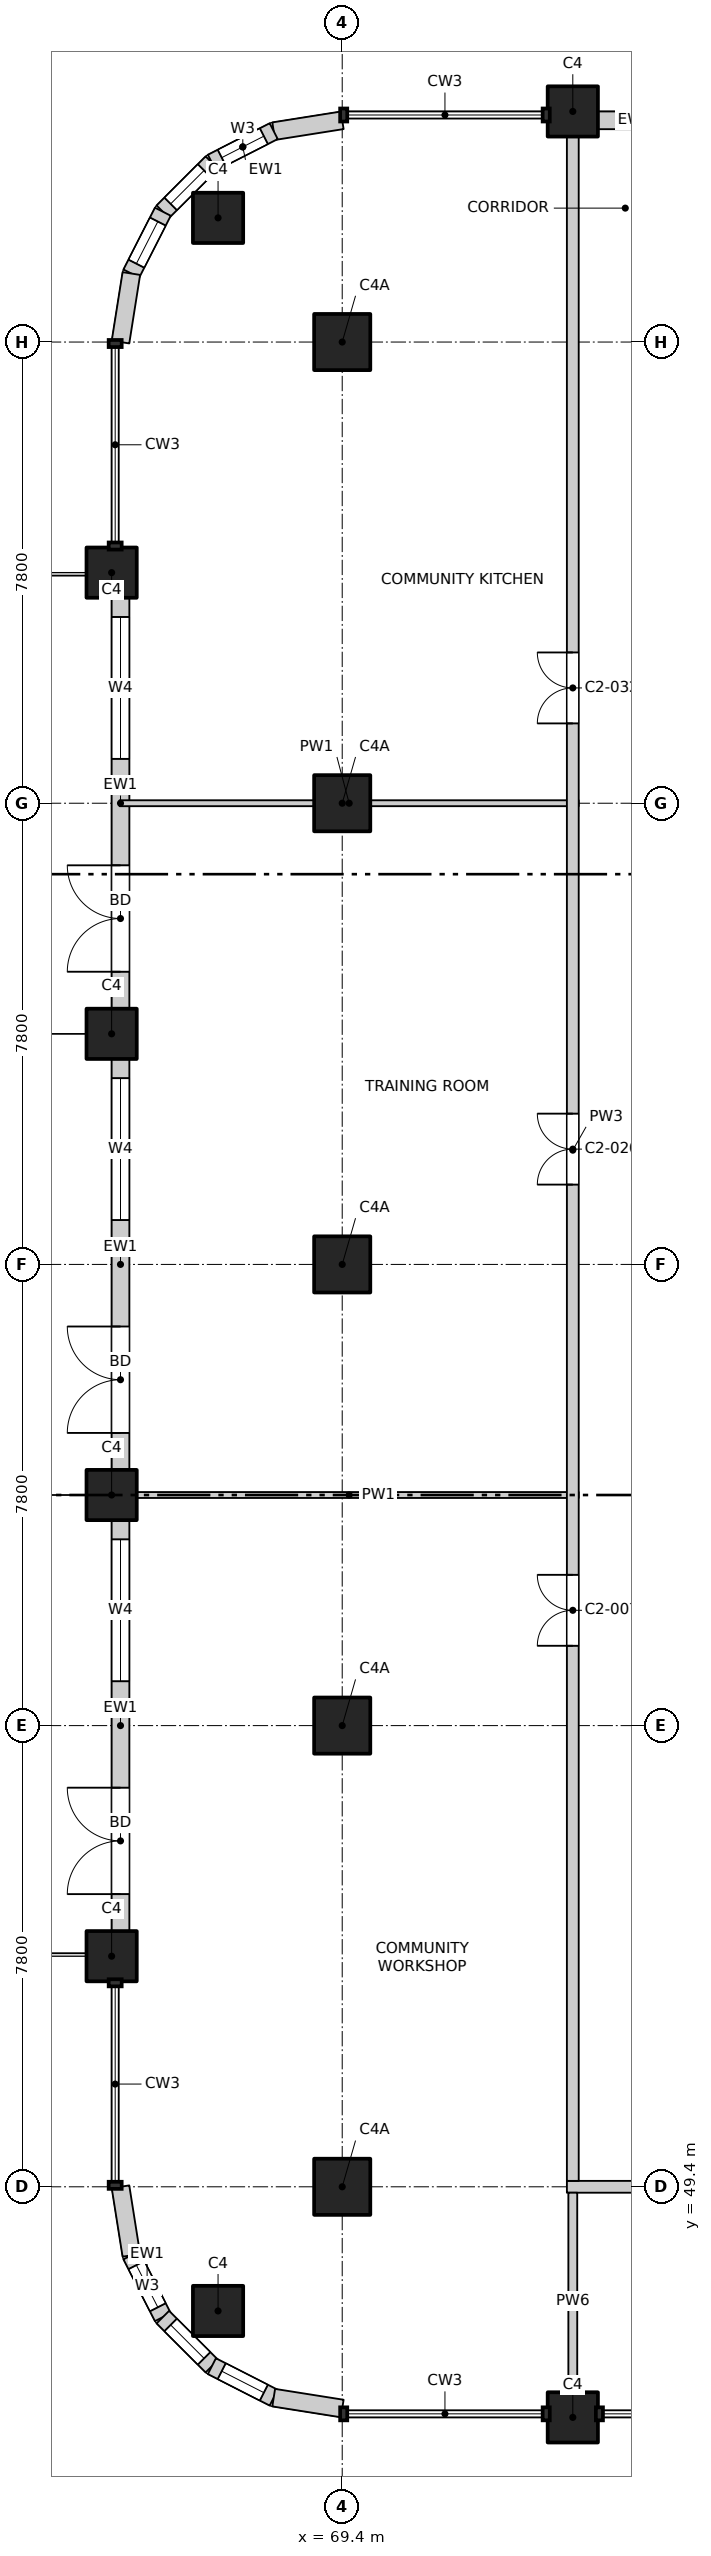
"""IFC4 building model, lengths in metres.
Left out: names, types, materials, properties, quantities, classifications, styles, units other than length and angle.
Written with IfcOpenShell. Run it as: python <this file> out.ifc"""

import sys

from ifc_helpers import new_model, si_unit, direction, frame, frame_2d, origin, origin_2d, place, context, subcontext, project, spatial, rectangle, extrude, element, fill, save


model = new_model("IFC4")
c1 = context("Model", 3, precision=1e-05, world=origin(), true_north=direction((0.0, 1.0)))
c2 = subcontext(c1, "Body", "Model", "MODEL_VIEW")
j1 = project(units=[si_unit("LENGTHUNIT", "METRE"), si_unit("PLANEANGLEUNIT", "RADIAN")], contexts=[c1])
p1 = place(None, origin())
s1 = spatial("IfcSite", under=j1, at=p1, CompositionType="ELEMENT")
p2 = place(p1, origin())
s2 = spatial("IfcBuilding", under=s1, at=p2, CompositionType="ELEMENT")
p3 = place(p2, frame((0.0, 0.0, 133.9)))
s3 = spatial("IfcBuildingStorey", under=s2, at=p3, CompositionType="ELEMENT", Elevation=133.9)
for number, where, z_axis, x_axis in (
    (1, (67.3, 47.3, -0.25), (0.0, 0.0, 1.0), (1.0, 0.0, 0.0)),
    (2, (67.3, 82.7, -0.25), (0.0, 0.0, 1.0), (1.0, 0.0, 0.0)),
    (3, (65.5, 53.3, -0.25), (0.0, 0.0, 1.0), (1.0, 0.0, 0.0)),
    (4, (73.3, 45.5, -0.25), (0.0, 0.0, 1.0), (1.0, 0.0, 0.0)),
    (5, (73.3, 84.5, -0.25), (0.0, 0.0, 1.0), (1.0, 0.0, 0.0)),
    (6, (65.5, 61.1, -0.25), (0.0, 0.0, 1.0), (1.0, 0.0, 0.0)),
    (7, (65.5, 68.9, -0.25), (0.0, 0.0, 1.0), (1.0, 0.0, 0.0)),
    (8, (65.5, 76.7, -0.25), (0.0, 0.0, 1.0), (1.0, 0.0, 0.0)),
):
    element("IfcColumn", number, at=place(p3, frame(where, z_axis=z_axis, x_axis=x_axis)), inside=s3, PredefinedType="COLUMN", context=c2, shape_type="SweptSolid", body=[
        extrude(rectangle(XDim=0.85, YDim=0.85, at=origin_2d()), origin(), (0.0, 0.0, 1.0), 3.4),
    ])
for number, where, z_axis, x_axis in (
    (9, (69.4, 49.4, -0.25), (0.0, 0.0, 1.0), (1.0, 0.0, 0.0)),
    (10, (69.4, 57.2, -0.25), (0.0, 0.0, 1.0), (1.0, 0.0, 0.0)),
    (11, (69.4, 65.0, -0.25), (0.0, 0.0, 1.0), (1.0, 0.0, 0.0)),
    (12, (69.4, 72.8, -0.25), (0.0, 0.0, 1.0), (1.0, 0.0, 0.0)),
    (13, (69.4, 80.6, -0.25), (0.0, 0.0, 1.0), (1.0, 0.0, 0.0)),
):
    element("IfcColumn", number, at=place(p3, frame(where, z_axis=z_axis, x_axis=x_axis)), inside=s3, PredefinedType="COLUMN", context=c2, shape_type="SweptSolid", body=[
        extrude(rectangle(XDim=0.95, YDim=0.95, at=origin_2d()), origin(), (0.0, 0.0, 1.0), 3.4),
    ])
p4 = place(p3, frame((73.725, 84.35, 0.0), z_axis=(0.0, 0.0, 1.0), x_axis=(1.0, 0.0, 0.0)))
e14 = element("IfcWall", 14, at=p4, inside=s3, PredefinedType="SOLIDWALL", context=c2, shape_type="SweptSolid", body=[
    extrude(rectangle(XDim=1.25, YDim=0.3, at=frame_2d((0.625, 0.0))), origin(), (0.0, 0.0, 1.0), 2.7),
])
p5 = place(p3, frame((65.65, 53.725, 0.0), z_axis=(0.0, 0.0, 1.0), x_axis=(0.0, 1.0, 0.0)))
e15 = element("IfcWall", 15, at=p5, inside=s3, PredefinedType="SOLIDWALL", context=c2, shape_type="SweptSolid", body=[
    extrude(rectangle(XDim=6.95, YDim=0.3, at=frame_2d((3.475, 0.0))), origin(), (0.0, 0.0, 1.0), 2.7),
])
p6 = place(p5, frame((0.625, 0.0, 0.0)))
e16 = element("IfcOpeningElement", 16, at=p6, cuts=e15, PredefinedType="OPENING", context=c2, shape_type="SweptSolid", body=[
    extrude(rectangle(XDim=1.8, YDim=2.4, at=frame_2d((0.9, 1.2))), frame((0.0, 0.16, 0.0), z_axis=(0.0, -1.0, 0.0), x_axis=(1.0, 0.0, 0.0)), (0.0, 0.0, 1.0), 0.32),
])
p7 = place(p5, frame((4.225, 0.0, 0.6)))
e17 = element("IfcOpeningElement", 17, at=p7, cuts=e15, PredefinedType="OPENING", context=c2, shape_type="SweptSolid", body=[
    extrude(rectangle(XDim=2.4, YDim=2.1, at=frame_2d((1.2, 1.05))), frame((0.0, 0.16, 0.0), z_axis=(0.0, -1.0, 0.0), x_axis=(1.0, 0.0, 0.0)), (0.0, 0.0, 1.0), 0.32),
])
p8 = place(p3, frame((65.65, 61.525, 0.0), z_axis=(0.0, 0.0, 1.0), x_axis=(0.0, 1.0, 0.0)))
e18 = element("IfcWall", 18, at=p8, inside=s3, PredefinedType="SOLIDWALL", context=c2, shape_type="SweptSolid", body=[
    extrude(rectangle(XDim=6.95, YDim=0.3, at=frame_2d((3.475, 0.0))), origin(), (0.0, 0.0, 1.0), 2.7),
])
p9 = place(p8, frame((0.625, 0.0, 0.0)))
e19 = element("IfcOpeningElement", 19, at=p9, cuts=e18, PredefinedType="OPENING", context=c2, shape_type="SweptSolid", body=[
    extrude(rectangle(XDim=1.8, YDim=2.4, at=frame_2d((0.9, 1.2))), frame((0.0, 0.16, 0.0), z_axis=(0.0, -1.0, 0.0), x_axis=(1.0, 0.0, 0.0)), (0.0, 0.0, 1.0), 0.32),
])
p10 = place(p8, frame((4.225, 0.0, 0.6)))
e20 = element("IfcOpeningElement", 20, at=p10, cuts=e18, PredefinedType="OPENING", context=c2, shape_type="SweptSolid", body=[
    extrude(rectangle(XDim=2.4, YDim=2.1, at=frame_2d((1.2, 1.05))), frame((0.0, 0.16, 0.0), z_axis=(0.0, -1.0, 0.0), x_axis=(1.0, 0.0, 0.0)), (0.0, 0.0, 1.0), 0.32),
])
p11 = place(p3, frame((65.65, 69.325, 0.0), z_axis=(0.0, 0.0, 1.0), x_axis=(0.0, 1.0, 0.0)))
e21 = element("IfcWall", 21, at=p11, inside=s3, PredefinedType="SOLIDWALL", context=c2, shape_type="SweptSolid", body=[
    extrude(rectangle(XDim=6.95, YDim=0.3, at=frame_2d((3.475, 0.0))), origin(), (0.0, 0.0, 1.0), 2.7),
])
p12 = place(p11, frame((0.625, 0.0, 0.0)))
e22 = element("IfcOpeningElement", 22, at=p12, cuts=e21, PredefinedType="OPENING", context=c2, shape_type="SweptSolid", body=[
    extrude(rectangle(XDim=1.8, YDim=2.4, at=frame_2d((0.9, 1.2))), frame((0.0, 0.16, 0.0), z_axis=(0.0, -1.0, 0.0), x_axis=(1.0, 0.0, 0.0)), (0.0, 0.0, 1.0), 0.32),
])
p13 = place(p11, frame((4.225, 0.0, 0.6)))
e23 = element("IfcOpeningElement", 23, at=p13, cuts=e21, PredefinedType="OPENING", context=c2, shape_type="SweptSolid", body=[
    extrude(rectangle(XDim=2.4, YDim=2.1, at=frame_2d((1.2, 1.05))), frame((0.0, 0.16, 0.0), z_axis=(0.0, -1.0, 0.0), x_axis=(1.0, 0.0, 0.0)), (0.0, 0.0, 1.0), 0.32),
])
p14 = place(p3, frame((69.4, 84.35, 0.0), z_axis=(0.0, 0.0, 1.0), x_axis=(-0.987678452879, -0.156496880861, 0.0)))
e24 = element("IfcWall", 24, at=p14, inside=s3, PredefinedType="SOLIDWALL", context=c2, shape_type="SweptSolid", body=[
    extrude(rectangle(XDim=1.173, YDim=0.3, at=frame_2d((0.586, 0.0))), origin(), (0.0, 0.0, 1.0), 2.7),
])
p15 = place(p3, frame((68.241, 84.167, 0.0), z_axis=(0.0, 0.0, 1.0), x_axis=(-0.890988677504, -0.454025524128, 0.0)))
e25 = element("IfcWall", 25, at=p15, inside=s3, PredefinedType="SOLIDWALL", context=c2, shape_type="SweptSolid", body=[
    extrude(rectangle(XDim=1.173, YDim=0.3, at=frame_2d((0.587, 0.0))), origin(), (0.0, 0.0, 1.0), 2.7),
])
p16 = place(p15, frame((0.187, 0.0, 0.9)))
e26 = element("IfcOpeningElement", 26, at=p16, cuts=e25, PredefinedType="OPENING", context=c2, shape_type="SweptSolid", body=[
    extrude(rectangle(XDim=0.8, YDim=1.2, at=frame_2d((0.4, 0.6))), frame((0.0, 0.16, 0.0), z_axis=(0.0, -1.0, 0.0), x_axis=(1.0, 0.0, 0.0)), (0.0, 0.0, 1.0), 0.32),
])
p17 = place(p3, frame((67.196, 83.634, 0.0), z_axis=(0.0, 0.0, 1.0), x_axis=(-0.707106781187, -0.707106781187, 0.0)))
e27 = element("IfcWall", 27, at=p17, inside=s3, PredefinedType="SOLIDWALL", context=c2, shape_type="SweptSolid", body=[
    extrude(rectangle(XDim=1.173, YDim=0.3, at=frame_2d((0.586, 0.0))), origin(), (0.0, 0.0, 1.0), 2.7),
])
p18 = place(p17, frame((0.187, 0.0, 0.9)))
e28 = element("IfcOpeningElement", 28, at=p18, cuts=e27, PredefinedType="OPENING", context=c2, shape_type="SweptSolid", body=[
    extrude(rectangle(XDim=0.8, YDim=1.2, at=frame_2d((0.4, 0.6))), frame((0.0, 0.16, 0.0), z_axis=(0.0, -1.0, 0.0), x_axis=(1.0, 0.0, 0.0)), (0.0, 0.0, 1.0), 0.32),
])
p19 = place(p3, frame((66.366, 82.804, 0.0), z_axis=(0.0, 0.0, 1.0), x_axis=(-0.454025524128, -0.890988677504, 0.0)))
e29 = element("IfcWall", 29, at=p19, inside=s3, PredefinedType="SOLIDWALL", context=c2, shape_type="SweptSolid", body=[
    extrude(rectangle(XDim=1.173, YDim=0.3, at=frame_2d((0.587, 0.0))), origin(), (0.0, 0.0, 1.0), 2.7),
])
p20 = place(p19, frame((0.187, 0.0, 0.9)))
e30 = element("IfcOpeningElement", 30, at=p20, cuts=e29, PredefinedType="OPENING", context=c2, shape_type="SweptSolid", body=[
    extrude(rectangle(XDim=0.8, YDim=1.2, at=frame_2d((0.4, 0.6))), frame((0.0, 0.16, 0.0), z_axis=(0.0, -1.0, 0.0), x_axis=(1.0, 0.0, 0.0)), (0.0, 0.0, 1.0), 0.32),
])
for number, where, z_axis, x_axis in (
    (31, (65.833, 81.759, 0.0), (0.0, 0.0, 1.0), (-0.156, -0.988, 0.0)),
    (32, (65.65, 49.4, 0.0), (0.0, 0.0, 1.0), (0.156, -0.988, 0.0)),
):
    element("IfcWall", number, at=place(p3, frame(where, z_axis=z_axis, x_axis=x_axis)), inside=s3, PredefinedType="SOLIDWALL", context=c2, shape_type="SweptSolid", body=[
        extrude(rectangle(XDim=1.173, YDim=0.3, at=frame_2d((0.586, 0.0))), origin(), (0.0, 0.0, 1.0), 2.7),
    ])
p21 = place(p3, frame((65.833, 48.241, 0.0), z_axis=(0.0, 0.0, 1.0), x_axis=(0.454025524128, -0.890988677504, 0.0)))
e33 = element("IfcWall", 33, at=p21, inside=s3, PredefinedType="SOLIDWALL", context=c2, shape_type="SweptSolid", body=[
    extrude(rectangle(XDim=1.173, YDim=0.3, at=frame_2d((0.587, 0.0))), origin(), (0.0, 0.0, 1.0), 2.7),
])
p22 = place(p21, frame((0.187, 0.0, 0.9)))
e34 = element("IfcOpeningElement", 34, at=p22, cuts=e33, PredefinedType="OPENING", context=c2, shape_type="SweptSolid", body=[
    extrude(rectangle(XDim=0.8, YDim=1.2, at=frame_2d((0.4, 0.6))), frame((0.0, 0.16, 0.0), z_axis=(0.0, -1.0, 0.0), x_axis=(1.0, 0.0, 0.0)), (0.0, 0.0, 1.0), 0.32),
])
p23 = place(p3, frame((66.366, 47.196, 0.0), z_axis=(0.0, 0.0, 1.0), x_axis=(0.707106781187, -0.707106781187, 0.0)))
e35 = element("IfcWall", 35, at=p23, inside=s3, PredefinedType="SOLIDWALL", context=c2, shape_type="SweptSolid", body=[
    extrude(rectangle(XDim=1.173, YDim=0.3, at=frame_2d((0.586, 0.0))), origin(), (0.0, 0.0, 1.0), 2.7),
])
p24 = place(p23, frame((0.187, 0.0, 0.9)))
e36 = element("IfcOpeningElement", 36, at=p24, cuts=e35, PredefinedType="OPENING", context=c2, shape_type="SweptSolid", body=[
    extrude(rectangle(XDim=0.8, YDim=1.2, at=frame_2d((0.4, 0.6))), frame((0.0, 0.16, 0.0), z_axis=(0.0, -1.0, 0.0), x_axis=(1.0, 0.0, 0.0)), (0.0, 0.0, 1.0), 0.32),
])
p25 = place(p3, frame((67.196, 46.366, 0.0), z_axis=(0.0, 0.0, 1.0), x_axis=(0.890988677504, -0.454025524128, 0.0)))
e37 = element("IfcWall", 37, at=p25, inside=s3, PredefinedType="SOLIDWALL", context=c2, shape_type="SweptSolid", body=[
    extrude(rectangle(XDim=1.173, YDim=0.3, at=frame_2d((0.587, 0.0))), origin(), (0.0, 0.0, 1.0), 2.7),
])
p26 = place(p25, frame((0.187, 0.0, 0.9)))
e38 = element("IfcOpeningElement", 38, at=p26, cuts=e37, PredefinedType="OPENING", context=c2, shape_type="SweptSolid", body=[
    extrude(rectangle(XDim=0.8, YDim=1.2, at=frame_2d((0.4, 0.6))), frame((0.0, 0.16, 0.0), z_axis=(0.0, -1.0, 0.0), x_axis=(1.0, 0.0, 0.0)), (0.0, 0.0, 1.0), 0.32),
])
p27 = place(p3, frame((68.241, 45.833, 0.0), z_axis=(0.0, 0.0, 1.0), x_axis=(0.987678452879, -0.156496880861, 0.0)))
e39 = element("IfcWall", 39, at=p27, inside=s3, PredefinedType="SOLIDWALL", context=c2, shape_type="SweptSolid", body=[
    extrude(rectangle(XDim=1.173, YDim=0.3, at=frame_2d((0.586, 0.0))), origin(), (0.0, 0.0, 1.0), 2.7),
])
p28 = place(p3, frame((73.2, 49.4, 0.0), z_axis=(0.0, 0.0, 1.0), x_axis=(1.0, 0.0, 0.0)))
e40 = element("IfcWall", 40, at=p28, inside=s3, PredefinedType="PARTITIONING", context=c2, shape_type="SweptSolid", body=[
    extrude(rectangle(XDim=23.6, YDim=0.2, at=frame_2d((11.8, 0.0))), origin(), (0.0, 0.0, 1.0), 3.15),
])
p29 = place(p28, frame((2.225, 0.0, 0.0)))
e41 = element("IfcOpeningElement", 41, at=p29, cuts=e40, PredefinedType="OPENING", context=c2, shape_type="SweptSolid", body=[
    extrude(rectangle(XDim=1.2, YDim=2.1, at=frame_2d((0.6, 1.05))), frame((0.0, 0.11, 0.0), z_axis=(0.0, -1.0, 0.0), x_axis=(1.0, 0.0, 0.0)), (0.0, 0.0, 1.0), 0.22),
])
p30 = place(p28, frame((15.1, 0.0, 0.0)))
e42 = element("IfcOpeningElement", 42, at=p30, cuts=e40, PredefinedType="OPENING", context=c2, shape_type="SweptSolid", body=[
    extrude(rectangle(XDim=1.2, YDim=2.1, at=frame_2d((0.6, 1.05))), frame((0.0, 0.11, 0.0), z_axis=(0.0, -1.0, 0.0), x_axis=(1.0, 0.0, 0.0)), (0.0, 0.0, 1.0), 0.22),
])
p31 = place(p3, frame((65.635, 61.1, 0.0), z_axis=(0.0, 0.0, 1.0), x_axis=(1.0, 0.0, 0.0)))
e43 = element("IfcWall", 43, at=p31, inside=s3, PredefinedType="PARTITIONING", context=c2, shape_type="SweptSolid", body=[
    extrude(rectangle(XDim=7.765, YDim=0.1, at=frame_2d((3.883, 0.0))), origin(), (0.0, 0.0, 1.0), 2.55),
])
p32 = place(p3, frame((65.635, 72.8, 0.0), z_axis=(0.0, 0.0, 1.0), x_axis=(1.0, 0.0, 0.0)))
e44 = element("IfcWall", 44, at=p32, inside=s3, PredefinedType="PARTITIONING", context=c2, shape_type="SweptSolid", body=[
    extrude(rectangle(XDim=7.765, YDim=0.1, at=frame_2d((3.883, 0.0))), origin(), (0.0, 0.0, 1.0), 3.15),
])
p33 = place(p3, frame((73.3, 45.635, 0.0), z_axis=(0.0, 0.0, 1.0), x_axis=(0.0, 1.0, 0.0)))
e45 = element("IfcWall", 45, at=p33, inside=s3, PredefinedType="PARTITIONING", context=c2, shape_type="SweptSolid", body=[
    extrude(rectangle(XDim=3.665, YDim=0.15, at=frame_2d((1.833, 0.0))), origin(), (0.0, 0.0, 1.0), 3.15),
])
p34 = place(p3, frame((73.3, 49.5, 0.0), z_axis=(0.0, 0.0, 1.0), x_axis=(0.0, 1.0, 0.0)))
e46 = element("IfcWall", 46, at=p34, inside=s3, PredefinedType="PARTITIONING", context=c2, shape_type="SweptSolid", body=[
    extrude(rectangle(XDim=34.865, YDim=0.2, at=frame_2d((17.433, 0.0))), origin(), (0.0, 0.0, 1.0), 3.15),
])
p35 = place(p34, frame((9.05, 0.0, 0.0)))
e47 = element("IfcOpeningElement", 47, at=p35, cuts=e46, PredefinedType="OPENING", context=c2, shape_type="SweptSolid", body=[
    extrude(rectangle(XDim=1.2, YDim=2.1, at=frame_2d((0.6, 1.05))), frame((0.0, 0.11, 0.0), z_axis=(0.0, -1.0, 0.0), x_axis=(1.0, 0.0, 0.0)), (0.0, 0.0, 1.0), 0.22),
])
p36 = place(p34, frame((16.85, 0.0, 0.0)))
e48 = element("IfcOpeningElement", 48, at=p36, cuts=e46, PredefinedType="OPENING", context=c2, shape_type="SweptSolid", body=[
    extrude(rectangle(XDim=1.2, YDim=2.1, at=frame_2d((0.6, 1.05))), frame((0.0, 0.11, 0.0), z_axis=(0.0, -1.0, 0.0), x_axis=(1.0, 0.0, 0.0)), (0.0, 0.0, 1.0), 0.22),
])
p37 = place(p34, frame((24.65, 0.0, 0.0)))
e49 = element("IfcOpeningElement", 49, at=p37, cuts=e46, PredefinedType="OPENING", context=c2, shape_type="SweptSolid", body=[
    extrude(rectangle(XDim=1.2, YDim=2.1, at=frame_2d((0.6, 1.05))), frame((0.0, 0.11, 0.0), z_axis=(0.0, -1.0, 0.0), x_axis=(1.0, 0.0, 0.0)), (0.0, 0.0, 1.0), 0.22),
])
p38 = place(p6, origin())
e50 = element("IfcDoor", 50, at=p38, inside=s3, OperationType="DOUBLE_DOOR_SINGLE_SWING", PredefinedType="DOOR", context=c2, shape_type="SweptSolid", body=[
    extrude(rectangle(XDim=1.8, YDim=2.4, at=frame_2d((0.9, 1.2))), frame((0.0, 0.025, 0.0), z_axis=(0.0, -1.0, 0.0), x_axis=(1.0, 0.0, 0.0)), (0.0, 0.0, 1.0), 0.05),
])
fill(e16, e50)
p39 = place(p7, origin())
e51 = element("IfcWindow", 51, at=p39, inside=s3, PartitioningType="SINGLE_PANEL", PredefinedType="WINDOW", context=c2, shape_type="SweptSolid", body=[
    extrude(rectangle(XDim=2.4, YDim=2.1, at=frame_2d((1.2, 1.05))), frame((0.0, 0.03, 0.0), z_axis=(0.0, -1.0, 0.0), x_axis=(1.0, 0.0, 0.0)), (0.0, 0.0, 1.0), 0.06),
])
fill(e17, e51)
p40 = place(p9, origin())
e52 = element("IfcDoor", 52, at=p40, inside=s3, OperationType="DOUBLE_DOOR_SINGLE_SWING", PredefinedType="DOOR", context=c2, shape_type="SweptSolid", body=[
    extrude(rectangle(XDim=1.8, YDim=2.4, at=frame_2d((0.9, 1.2))), frame((0.0, 0.025, 0.0), z_axis=(0.0, -1.0, 0.0), x_axis=(1.0, 0.0, 0.0)), (0.0, 0.0, 1.0), 0.05),
])
fill(e19, e52)
p41 = place(p10, origin())
e53 = element("IfcWindow", 53, at=p41, inside=s3, PartitioningType="SINGLE_PANEL", PredefinedType="WINDOW", context=c2, shape_type="SweptSolid", body=[
    extrude(rectangle(XDim=2.4, YDim=2.1, at=frame_2d((1.2, 1.05))), frame((0.0, 0.03, 0.0), z_axis=(0.0, -1.0, 0.0), x_axis=(1.0, 0.0, 0.0)), (0.0, 0.0, 1.0), 0.06),
])
fill(e20, e53)
p42 = place(p12, origin())
e54 = element("IfcDoor", 54, at=p42, inside=s3, OperationType="DOUBLE_DOOR_SINGLE_SWING", PredefinedType="DOOR", context=c2, shape_type="SweptSolid", body=[
    extrude(rectangle(XDim=1.8, YDim=2.4, at=frame_2d((0.9, 1.2))), frame((0.0, 0.025, 0.0), z_axis=(0.0, -1.0, 0.0), x_axis=(1.0, 0.0, 0.0)), (0.0, 0.0, 1.0), 0.05),
])
fill(e22, e54)
p43 = place(p13, origin())
e55 = element("IfcWindow", 55, at=p43, inside=s3, PartitioningType="SINGLE_PANEL", PredefinedType="WINDOW", context=c2, shape_type="SweptSolid", body=[
    extrude(rectangle(XDim=2.4, YDim=2.1, at=frame_2d((1.2, 1.05))), frame((0.0, 0.03, 0.0), z_axis=(0.0, -1.0, 0.0), x_axis=(1.0, 0.0, 0.0)), (0.0, 0.0, 1.0), 0.06),
])
fill(e23, e55)
p44 = place(p16, origin())
e56 = element("IfcWindow", 56, at=p44, inside=s3, PartitioningType="SINGLE_PANEL", PredefinedType="WINDOW", context=c2, shape_type="SweptSolid", body=[
    extrude(rectangle(XDim=0.8, YDim=1.2, at=frame_2d((0.4, 0.6))), frame((0.0, 0.03, 0.0), z_axis=(0.0, -1.0, 0.0), x_axis=(1.0, 0.0, 0.0)), (0.0, 0.0, 1.0), 0.06),
])
fill(e26, e56)
p45 = place(p18, origin())
e57 = element("IfcWindow", 57, at=p45, inside=s3, PartitioningType="SINGLE_PANEL", PredefinedType="WINDOW", context=c2, shape_type="SweptSolid", body=[
    extrude(rectangle(XDim=0.8, YDim=1.2, at=frame_2d((0.4, 0.6))), frame((0.0, 0.03, 0.0), z_axis=(0.0, -1.0, 0.0), x_axis=(1.0, 0.0, 0.0)), (0.0, 0.0, 1.0), 0.06),
])
fill(e28, e57)
p46 = place(p20, origin())
e58 = element("IfcWindow", 58, at=p46, inside=s3, PartitioningType="SINGLE_PANEL", PredefinedType="WINDOW", context=c2, shape_type="SweptSolid", body=[
    extrude(rectangle(XDim=0.8, YDim=1.2, at=frame_2d((0.4, 0.6))), frame((0.0, 0.03, 0.0), z_axis=(0.0, -1.0, 0.0), x_axis=(1.0, 0.0, 0.0)), (0.0, 0.0, 1.0), 0.06),
])
fill(e30, e58)
p47 = place(p22, origin())
e59 = element("IfcWindow", 59, at=p47, inside=s3, PartitioningType="SINGLE_PANEL", PredefinedType="WINDOW", context=c2, shape_type="SweptSolid", body=[
    extrude(rectangle(XDim=0.8, YDim=1.2, at=frame_2d((0.4, 0.6))), frame((0.0, 0.03, 0.0), z_axis=(0.0, -1.0, 0.0), x_axis=(1.0, 0.0, 0.0)), (0.0, 0.0, 1.0), 0.06),
])
fill(e34, e59)
p48 = place(p24, origin())
e60 = element("IfcWindow", 60, at=p48, inside=s3, PartitioningType="SINGLE_PANEL", PredefinedType="WINDOW", context=c2, shape_type="SweptSolid", body=[
    extrude(rectangle(XDim=0.8, YDim=1.2, at=frame_2d((0.4, 0.6))), frame((0.0, 0.03, 0.0), z_axis=(0.0, -1.0, 0.0), x_axis=(1.0, 0.0, 0.0)), (0.0, 0.0, 1.0), 0.06),
])
fill(e36, e60)
p49 = place(p26, origin())
e61 = element("IfcWindow", 61, at=p49, inside=s3, PartitioningType="SINGLE_PANEL", PredefinedType="WINDOW", context=c2, shape_type="SweptSolid", body=[
    extrude(rectangle(XDim=0.8, YDim=1.2, at=frame_2d((0.4, 0.6))), frame((0.0, 0.03, 0.0), z_axis=(0.0, -1.0, 0.0), x_axis=(1.0, 0.0, 0.0)), (0.0, 0.0, 1.0), 0.06),
])
fill(e38, e61)
p50 = place(p35, origin())
e62 = element("IfcDoor", 62, at=p50, inside=s3, OperationType="DOUBLE_DOOR_SINGLE_SWING", PredefinedType="DOOR", context=c2, shape_type="SweptSolid", body=[
    extrude(rectangle(XDim=1.2, YDim=2.1, at=frame_2d((0.6, 1.05))), frame((0.0, 0.025, 0.0), z_axis=(0.0, -1.0, 0.0), x_axis=(1.0, 0.0, 0.0)), (0.0, 0.0, 1.0), 0.05),
])
fill(e47, e62)
p51 = place(p36, origin())
e63 = element("IfcDoor", 63, at=p51, inside=s3, OperationType="DOUBLE_DOOR_SINGLE_SWING", PredefinedType="DOOR", context=c2, shape_type="SweptSolid", body=[
    extrude(rectangle(XDim=1.2, YDim=2.1, at=frame_2d((0.6, 1.05))), frame((0.0, 0.025, 0.0), z_axis=(0.0, -1.0, 0.0), x_axis=(1.0, 0.0, 0.0)), (0.0, 0.0, 1.0), 0.05),
])
fill(e48, e63)
p52 = place(p37, origin())
e64 = element("IfcDoor", 64, at=p52, inside=s3, OperationType="DOUBLE_DOOR_SINGLE_SWING", PredefinedType="DOOR", context=c2, shape_type="SweptSolid", body=[
    extrude(rectangle(XDim=1.2, YDim=2.1, at=frame_2d((0.6, 1.05))), frame((0.0, 0.025, 0.0), z_axis=(0.0, -1.0, 0.0), x_axis=(1.0, 0.0, 0.0)), (0.0, 0.0, 1.0), 0.05),
])
fill(e49, e64)
save(model, sys.argv[1])
